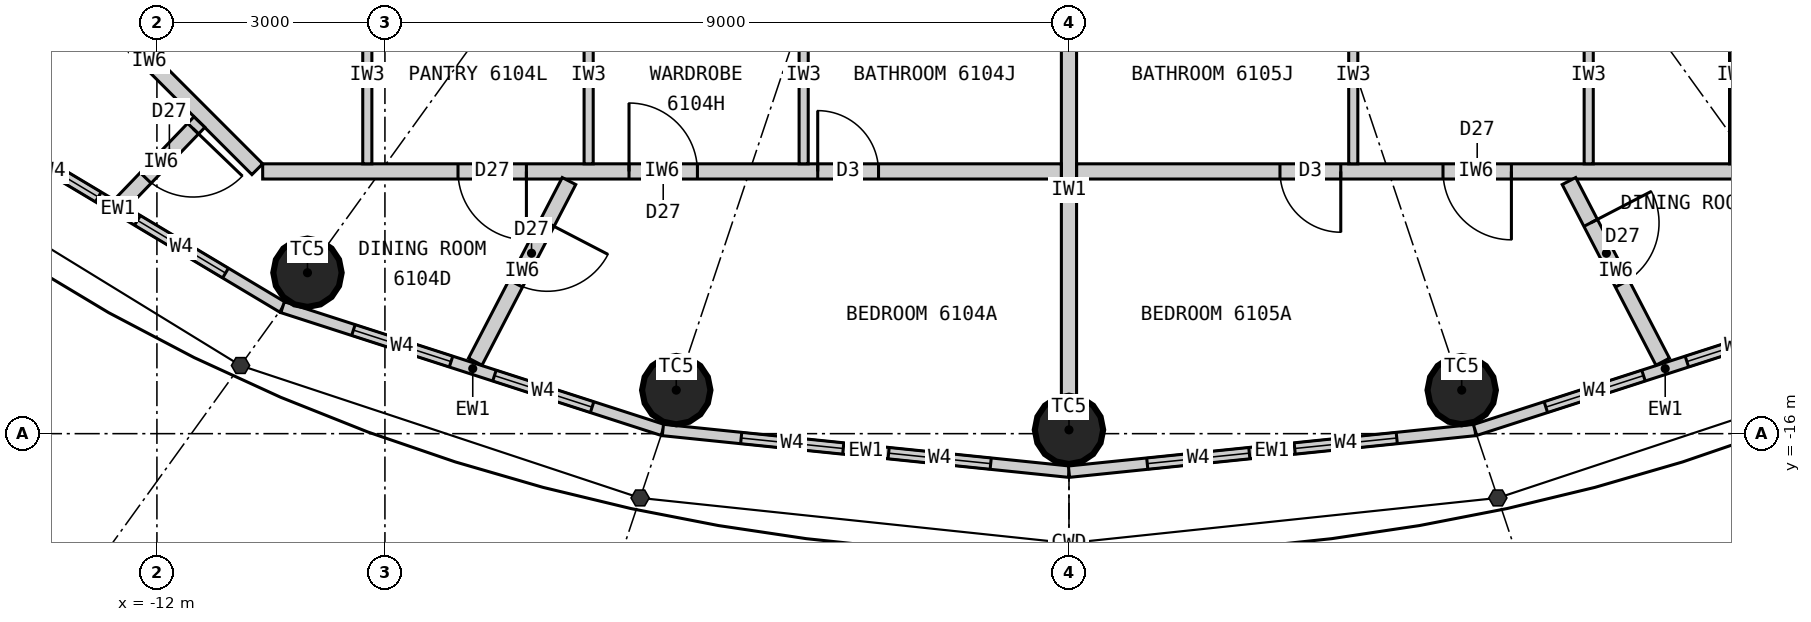
"""IFC4 building model, lengths in metres.
Left out: names, types, materials, properties, quantities, classifications, styles, units other than length and angle.
Written with IfcOpenShell. Run it as: python <this file> out.ifc"""

import sys

from ifc_helpers import new_model, si_unit, direction, frame, frame_2d, origin, origin_2d, place, context, subcontext, project, spatial, rectangle, circle, extrude, element, fill, save


model = new_model("IFC4")
c1 = context("Model", 3, precision=1e-05, world=origin(), true_north=direction((0.0, 1.0)))
c2 = subcontext(c1, "Body", "Model", "MODEL_VIEW")
j1 = project(units=[si_unit("LENGTHUNIT", "METRE"), si_unit("PLANEANGLEUNIT", "RADIAN")], contexts=[c1])
p1 = place(None, origin())
s1 = spatial("IfcSite", under=j1, at=p1, CompositionType="ELEMENT")
p2 = place(p1, origin())
s2 = spatial("IfcBuilding", under=s1, at=p2, CompositionType="ELEMENT")
p3 = place(p2, frame((0.0, 0.0, 225.9)))
s3 = spatial("IfcBuildingStorey", under=s2, at=p3, CompositionType="ELEMENT", Elevation=225.9)
for number, where, z_axis, x_axis in (
    (1, (-10.019, -13.883, 0.0), (0.0, 0.0, 1.0), (1.0, 0.0, 0.0)),
    (2, (-5.167, -15.427, 0.0), (0.0, 0.0, 1.0), (1.0, 0.0, 0.0)),
    (3, (0.0, -15.95, 0.0), (0.0, 0.0, 1.0), (1.0, 0.0, 0.0)),
    (4, (5.167, -15.427, 0.0), (0.0, 0.0, 1.0), (1.0, 0.0, 0.0)),
):
    element("IfcColumn", number, at=place(p3, frame(where, z_axis=z_axis, x_axis=x_axis)), inside=s3, PredefinedType="COLUMN", context=c2, shape_type="SweptSolid", body=[
        extrude(circle(Radius=0.45, at=origin_2d()), origin(), (0.0, 0.0, 1.0), 3.3),
    ])
p4 = place(p3, frame((-14.68, -11.744, 0.0), z_axis=(0.0, 0.0, 1.0), x_axis=(0.85822150553, -0.513279502265, 0.0)))
e5 = element("IfcWall", 5, at=p4, inside=s3, PredefinedType="ELEMENTEDWALL", context=c2, shape_type="SweptSolid", body=[
    extrude(rectangle(XDim=5.05, YDim=0.15, at=frame_2d((2.525, 0.0))), origin(), (0.0, 0.0, 1.0), 3.12),
])
p5 = place(p4, frame((0.875, 0.0, 0.9)))
e6 = element("IfcOpeningElement", 6, at=p5, cuts=e5, PredefinedType="OPENING", context=c2, shape_type="SweptSolid", body=[
    extrude(rectangle(XDim=1.35, YDim=1.9, at=frame_2d((0.675, 0.95))), frame((0.0, 0.085, 0.0), z_axis=(0.0, -1.0, 0.0), x_axis=(1.0, 0.0, 0.0)), (0.0, 0.0, 1.0), 0.17),
])
p6 = place(p4, frame((2.825, 0.0, 0.9)))
e7 = element("IfcOpeningElement", 7, at=p6, cuts=e5, PredefinedType="OPENING", context=c2, shape_type="SweptSolid", body=[
    extrude(rectangle(XDim=1.35, YDim=1.9, at=frame_2d((0.675, 0.95))), frame((0.0, 0.085, 0.0), z_axis=(0.0, -1.0, 0.0), x_axis=(1.0, 0.0, 0.0)), (0.0, 0.0, 1.0), 0.17),
])
p7 = place(p3, frame((-10.346, -14.336, 0.0), z_axis=(0.0, 0.0, 1.0), x_axis=(0.951644702515, -0.307200846638, 0.0)))
e8 = element("IfcWall", 8, at=p7, inside=s3, PredefinedType="ELEMENTEDWALL", context=c2, shape_type="SweptSolid", body=[
    extrude(rectangle(XDim=5.258, YDim=0.15, at=frame_2d((2.629, 0.0))), origin(), (0.0, 0.0, 1.0), 3.12),
])
p8 = place(p7, frame((0.979, 0.0, 0.9)))
e9 = element("IfcOpeningElement", 9, at=p8, cuts=e8, PredefinedType="OPENING", context=c2, shape_type="SweptSolid", body=[
    extrude(rectangle(XDim=1.35, YDim=1.9, at=frame_2d((0.675, 0.95))), frame((0.0, 0.085, 0.0), z_axis=(0.0, -1.0, 0.0), x_axis=(1.0, 0.0, 0.0)), (0.0, 0.0, 1.0), 0.17),
])
p9 = place(p7, frame((2.929, 0.0, 0.9)))
e10 = element("IfcOpeningElement", 10, at=p9, cuts=e8, PredefinedType="OPENING", context=c2, shape_type="SweptSolid", body=[
    extrude(rectangle(XDim=1.35, YDim=1.9, at=frame_2d((0.675, 0.95))), frame((0.0, 0.085, 0.0), z_axis=(0.0, -1.0, 0.0), x_axis=(1.0, 0.0, 0.0)), (0.0, 0.0, 1.0), 0.17),
])
p10 = place(p3, frame((-5.343, -15.952, 0.0), z_axis=(0.0, 0.0, 1.0), x_axis=(0.994774574972, -0.102095763818, 0.0)))
e11 = element("IfcWall", 11, at=p10, inside=s3, PredefinedType="ELEMENTEDWALL", context=c2, shape_type="SweptSolid", body=[
    extrude(rectangle(XDim=5.371, YDim=0.15, at=frame_2d((2.686, 0.0))), origin(), (0.0, 0.0, 1.0), 3.12),
])
p11 = place(p10, frame((1.035, 0.0, 0.9)))
e12 = element("IfcOpeningElement", 12, at=p11, cuts=e11, PredefinedType="OPENING", context=c2, shape_type="SweptSolid", body=[
    extrude(rectangle(XDim=1.35, YDim=1.9, at=frame_2d((0.675, 0.95))), frame((0.0, 0.085, 0.0), z_axis=(0.0, -1.0, 0.0), x_axis=(1.0, 0.0, 0.0)), (0.0, 0.0, 1.0), 0.17),
])
p12 = place(p10, frame((2.985, 0.0, 0.9)))
e13 = element("IfcOpeningElement", 13, at=p12, cuts=e11, PredefinedType="OPENING", context=c2, shape_type="SweptSolid", body=[
    extrude(rectangle(XDim=1.35, YDim=1.9, at=frame_2d((0.675, 0.95))), frame((0.0, 0.085, 0.0), z_axis=(0.0, -1.0, 0.0), x_axis=(1.0, 0.0, 0.0)), (0.0, 0.0, 1.0), 0.17),
])
p13 = place(p3, frame((0.0, -16.5, 0.0), z_axis=(0.0, 0.0, 1.0), x_axis=(0.994774574972, 0.102095763818, 0.0)))
e14 = element("IfcWall", 14, at=p13, inside=s3, PredefinedType="ELEMENTEDWALL", context=c2, shape_type="SweptSolid", body=[
    extrude(rectangle(XDim=5.371, YDim=0.15, at=frame_2d((2.686, 0.0))), origin(), (0.0, 0.0, 1.0), 3.12),
])
p14 = place(p13, frame((1.035, 0.0, 0.9)))
e15 = element("IfcOpeningElement", 15, at=p14, cuts=e14, PredefinedType="OPENING", context=c2, shape_type="SweptSolid", body=[
    extrude(rectangle(XDim=1.35, YDim=1.9, at=frame_2d((0.675, 0.95))), frame((0.0, 0.085, 0.0), z_axis=(0.0, -1.0, 0.0), x_axis=(1.0, 0.0, 0.0)), (0.0, 0.0, 1.0), 0.17),
])
p15 = place(p13, frame((2.985, 0.0, 0.9)))
e16 = element("IfcOpeningElement", 16, at=p15, cuts=e14, PredefinedType="OPENING", context=c2, shape_type="SweptSolid", body=[
    extrude(rectangle(XDim=1.35, YDim=1.9, at=frame_2d((0.675, 0.95))), frame((0.0, 0.085, 0.0), z_axis=(0.0, -1.0, 0.0), x_axis=(1.0, 0.0, 0.0)), (0.0, 0.0, 1.0), 0.17),
])
p16 = place(p3, frame((5.343, -15.952, 0.0), z_axis=(0.0, 0.0, 1.0), x_axis=(0.951644702515, 0.307200846638, 0.0)))
e17 = element("IfcWall", 17, at=p16, inside=s3, PredefinedType="ELEMENTEDWALL", context=c2, shape_type="SweptSolid", body=[
    extrude(rectangle(XDim=5.258, YDim=0.15, at=frame_2d((2.629, 0.0))), origin(), (0.0, 0.0, 1.0), 3.12),
])
p17 = place(p16, frame((0.979, 0.0, 0.9)))
e18 = element("IfcOpeningElement", 18, at=p17, cuts=e17, PredefinedType="OPENING", context=c2, shape_type="SweptSolid", body=[
    extrude(rectangle(XDim=1.35, YDim=1.9, at=frame_2d((0.675, 0.95))), frame((0.0, 0.085, 0.0), z_axis=(0.0, -1.0, 0.0), x_axis=(1.0, 0.0, 0.0)), (0.0, 0.0, 1.0), 0.17),
])
p18 = place(p16, frame((2.929, 0.0, 0.9)))
e19 = element("IfcOpeningElement", 19, at=p18, cuts=e17, PredefinedType="OPENING", context=c2, shape_type="SweptSolid", body=[
    extrude(rectangle(XDim=1.35, YDim=1.9, at=frame_2d((0.675, 0.95))), frame((0.0, 0.085, 0.0), z_axis=(0.0, -1.0, 0.0), x_axis=(1.0, 0.0, 0.0)), (0.0, 0.0, 1.0), 0.17),
])
p19 = place(p3, frame((0.0, -10.1, 0.0), z_axis=(0.0, 0.0, 1.0), x_axis=(0.0, -1.0, 0.0)))
e20 = element("IfcWall", 20, at=p19, inside=s3, PredefinedType="PARTITIONING", context=c2, shape_type="SweptSolid", body=[
    extrude(rectangle(XDim=5.4, YDim=0.2, at=frame_2d((2.7, 0.0))), origin(), (0.0, 0.0, 1.0), 2.42),
])
p20 = place(p3, frame((-13.521, -9.679, 0.0), z_axis=(0.0, 0.0, 1.0), x_axis=(0.707106781187, -0.707106781187, 0.0)))
e21 = element("IfcWall", 21, at=p20, inside=s3, PredefinedType="PARTITIONING", context=c2, shape_type="SweptSolid", body=[
    extrude(rectangle(XDim=4.019, YDim=0.2, at=frame_2d((2.009, 0.0))), origin(), (0.0, 0.0, 1.0), 3.12),
])
p21 = place(p3, frame((-10.609, -12.55, 0.0), z_axis=(0.0, 0.0, 1.0), x_axis=(1.0, 0.0, 0.0)))
e22 = element("IfcWall", 22, at=p21, inside=s3, PredefinedType="PARTITIONING", context=c2, shape_type="SweptSolid", body=[
    extrude(rectangle(XDim=10.508, YDim=0.2, at=frame_2d((5.254, 0.0))), origin(), (0.0, 0.0, 1.0), 3.12),
])
p22 = place(p21, frame((2.57, 0.0, 0.0)))
e23 = element("IfcOpeningElement", 23, at=p22, cuts=e22, PredefinedType="OPENING", context=c2, shape_type="SweptSolid", body=[
    extrude(rectangle(XDim=0.9, YDim=2.1, at=frame_2d((0.45, 1.05))), frame((0.0, 0.11, 0.0), z_axis=(0.0, -1.0, 0.0), x_axis=(1.0, 0.0, 0.0)), (0.0, 0.0, 1.0), 0.22),
])
p23 = place(p21, frame((4.82, 0.0, 0.0)))
e24 = element("IfcOpeningElement", 24, at=p23, cuts=e22, PredefinedType="OPENING", context=c2, shape_type="SweptSolid", body=[
    extrude(rectangle(XDim=0.9, YDim=2.1, at=frame_2d((0.45, 1.05))), frame((0.0, 0.11, 0.0), z_axis=(0.0, -1.0, 0.0), x_axis=(1.0, 0.0, 0.0)), (0.0, 0.0, 1.0), 0.22),
])
p24 = place(p21, frame((7.303, 0.0, 0.0)))
e25 = element("IfcOpeningElement", 25, at=p24, cuts=e22, PredefinedType="OPENING", context=c2, shape_type="SweptSolid", body=[
    extrude(rectangle(XDim=0.8, YDim=2.1, at=frame_2d((0.4, 1.05))), frame((0.0, 0.11, 0.0), z_axis=(0.0, -1.0, 0.0), x_axis=(1.0, 0.0, 0.0)), (0.0, 0.0, 1.0), 0.22),
])
p25 = place(p3, frame((-11.441, -11.9, 0.0), z_axis=(0.0, 0.0, 1.0), x_axis=(-0.692958717259, -0.720977264672, 0.0)))
e26 = element("IfcWall", 26, at=p25, inside=s3, PredefinedType="PARTITIONING", context=c2, shape_type="SweptSolid", body=[
    extrude(rectangle(XDim=1.464, YDim=0.2, at=frame_2d((0.732, 0.0))), origin(), (0.0, 0.0, 1.0), 3.12),
])
p26 = place(p25, frame((0.12, 0.0, 0.0)))
e27 = element("IfcOpeningElement", 27, at=p26, cuts=e26, PredefinedType="OPENING", context=c2, shape_type="SweptSolid", body=[
    extrude(rectangle(XDim=0.9, YDim=2.1, at=frame_2d((0.45, 1.05))), frame((0.0, 0.11, 0.0), z_axis=(0.0, -1.0, 0.0), x_axis=(1.0, 0.0, 0.0)), (0.0, 0.0, 1.0), 0.22),
])
p27 = place(p3, frame((-6.578, -12.677, 0.0), z_axis=(0.0, 0.0, 1.0), x_axis=(-0.460620531465, -0.887597164255, 0.0)))
e28 = element("IfcWall", 28, at=p27, inside=s3, PredefinedType="PARTITIONING", context=c2, shape_type="SweptSolid", body=[
    extrude(rectangle(XDim=2.678, YDim=0.2, at=frame_2d((1.339, 0.0))), origin(), (0.0, 0.0, 1.0), 3.12),
])
p28 = place(p27, frame((0.62, 0.0, 0.0)))
e29 = element("IfcOpeningElement", 29, at=p28, cuts=e28, PredefinedType="OPENING", context=c2, shape_type="SweptSolid", body=[
    extrude(rectangle(XDim=0.9, YDim=2.1, at=frame_2d((0.45, 1.05))), frame((0.0, 0.11, 0.0), z_axis=(0.0, -1.0, 0.0), x_axis=(1.0, 0.0, 0.0)), (0.0, 0.0, 1.0), 0.22),
])
for number, where, z_axis, x_axis in (
    (30, (-9.232, -10.1, 0.0), (0.0, 0.0, 1.0), (0.0, -1.0, 0.0)),
    (31, (-6.32, -10.1, 0.0), (0.0, 0.0, 1.0), (0.0, -1.0, 0.0)),
    (32, (-3.491, -10.1, 0.0), (0.0, 0.0, 1.0), (0.0, -1.0, 0.0)),
):
    element("IfcWall", number, at=place(p3, frame(where, z_axis=z_axis, x_axis=x_axis)), inside=s3, PredefinedType="PARTITIONING", context=c2, shape_type="SweptSolid", body=[
        extrude(rectangle(XDim=2.35, YDim=0.12, at=frame_2d((1.175, 0.0))), origin(), (0.0, 0.0, 1.0), 3.12),
    ])
p29 = place(p3, frame((0.101, -12.55, 0.0), z_axis=(0.0, 0.0, 1.0), x_axis=(1.0, 0.0, 0.0)))
e33 = element("IfcWall", 33, at=p29, inside=s3, PredefinedType="PARTITIONING", context=c2, shape_type="SweptSolid", body=[
    extrude(rectangle(XDim=10.508, YDim=0.2, at=frame_2d((5.254, 0.0))), origin(), (0.0, 0.0, 1.0), 3.12),
])
p30 = place(p29, frame((2.675, 0.0, 0.0)))
e34 = element("IfcOpeningElement", 34, at=p30, cuts=e33, PredefinedType="OPENING", context=c2, shape_type="SweptSolid", body=[
    extrude(rectangle(XDim=0.8, YDim=2.1, at=frame_2d((0.4, 1.05))), frame((0.0, 0.11, 0.0), z_axis=(0.0, -1.0, 0.0), x_axis=(1.0, 0.0, 0.0)), (0.0, 0.0, 1.0), 0.22),
])
p31 = place(p29, frame((4.82, 0.0, 0.0)))
e35 = element("IfcOpeningElement", 35, at=p31, cuts=e33, PredefinedType="OPENING", context=c2, shape_type="SweptSolid", body=[
    extrude(rectangle(XDim=0.9, YDim=2.1, at=frame_2d((0.45, 1.05))), frame((0.0, 0.11, 0.0), z_axis=(0.0, -1.0, 0.0), x_axis=(1.0, 0.0, 0.0)), (0.0, 0.0, 1.0), 0.22),
])
p32 = place(p3, frame((6.578, -12.677, 0.0), z_axis=(0.0, 0.0, 1.0), x_axis=(0.460620531465, -0.887597164255, 0.0)))
e36 = element("IfcWall", 36, at=p32, inside=s3, PredefinedType="PARTITIONING", context=c2, shape_type="SweptSolid", body=[
    extrude(rectangle(XDim=2.678, YDim=0.2, at=frame_2d((1.339, 0.0))), origin(), (0.0, 0.0, 1.0), 3.12),
])
p33 = place(p32, frame((0.62, 0.0, 0.0)))
e37 = element("IfcOpeningElement", 37, at=p33, cuts=e36, PredefinedType="OPENING", context=c2, shape_type="SweptSolid", body=[
    extrude(rectangle(XDim=0.9, YDim=2.1, at=frame_2d((0.45, 1.05))), frame((0.0, 0.11, 0.0), z_axis=(0.0, -1.0, 0.0), x_axis=(1.0, 0.0, 0.0)), (0.0, 0.0, 1.0), 0.22),
])
for number, where, z_axis, x_axis in (
    (38, (3.74, -10.1, 0.0), (0.0, 0.0, 1.0), (0.0, -1.0, 0.0)),
    (39, (6.838, -10.1, 0.0), (0.0, 0.0, 1.0), (0.0, -1.0, 0.0)),
):
    element("IfcWall", number, at=place(p3, frame(where, z_axis=z_axis, x_axis=x_axis)), inside=s3, PredefinedType="PARTITIONING", context=c2, shape_type="SweptSolid", body=[
        extrude(rectangle(XDim=2.35, YDim=0.12, at=frame_2d((1.175, 0.0))), origin(), (0.0, 0.0, 1.0), 3.12),
    ])
p34 = place(p3, frame((8.751, -10.1, 0.0), z_axis=(0.0, 0.0, 1.0), x_axis=(0.0, -1.0, 0.0)))
e40 = element("IfcWall", 40, at=p34, inside=s3, PredefinedType="PARTITIONING", context=c2, shape_type="SweptSolid", body=[
    extrude(rectangle(XDim=2.35, YDim=0.12, at=frame_2d((1.175, 0.0))), origin(), (0.0, 0.0, 1.0), 3.12),
])
p35 = place(p34, frame((0.77, 0.0, 0.0)))
e41 = element("IfcOpeningElement", 41, at=p35, cuts=e40, PredefinedType="OPENING", context=c2, shape_type="SweptSolid", body=[
    extrude(rectangle(XDim=0.8, YDim=2.1, at=frame_2d((0.4, 1.05))), frame((0.0, 0.07, 0.0), z_axis=(0.0, -1.0, 0.0), x_axis=(1.0, 0.0, 0.0)), (0.0, 0.0, 1.0), 0.14),
])
p36 = place(p5, origin())
e42 = element("IfcWindow", 42, at=p36, inside=s3, PartitioningType="SINGLE_PANEL", PredefinedType="WINDOW", context=c2, shape_type="SweptSolid", body=[
    extrude(rectangle(XDim=1.35, YDim=1.9, at=frame_2d((0.675, 0.95))), frame((0.0, 0.03, 0.0), z_axis=(0.0, -1.0, 0.0), x_axis=(1.0, 0.0, 0.0)), (0.0, 0.0, 1.0), 0.06),
])
fill(e6, e42)
p37 = place(p6, origin())
e43 = element("IfcWindow", 43, at=p37, inside=s3, PartitioningType="SINGLE_PANEL", PredefinedType="WINDOW", context=c2, shape_type="SweptSolid", body=[
    extrude(rectangle(XDim=1.35, YDim=1.9, at=frame_2d((0.675, 0.95))), frame((0.0, 0.03, 0.0), z_axis=(0.0, -1.0, 0.0), x_axis=(1.0, 0.0, 0.0)), (0.0, 0.0, 1.0), 0.06),
])
fill(e7, e43)
p38 = place(p8, origin())
e44 = element("IfcWindow", 44, at=p38, inside=s3, PartitioningType="SINGLE_PANEL", PredefinedType="WINDOW", context=c2, shape_type="SweptSolid", body=[
    extrude(rectangle(XDim=1.35, YDim=1.9, at=frame_2d((0.675, 0.95))), frame((0.0, 0.03, 0.0), z_axis=(0.0, -1.0, 0.0), x_axis=(1.0, 0.0, 0.0)), (0.0, 0.0, 1.0), 0.06),
])
fill(e9, e44)
p39 = place(p9, origin())
e45 = element("IfcWindow", 45, at=p39, inside=s3, PartitioningType="SINGLE_PANEL", PredefinedType="WINDOW", context=c2, shape_type="SweptSolid", body=[
    extrude(rectangle(XDim=1.35, YDim=1.9, at=frame_2d((0.675, 0.95))), frame((0.0, 0.03, 0.0), z_axis=(0.0, -1.0, 0.0), x_axis=(1.0, 0.0, 0.0)), (0.0, 0.0, 1.0), 0.06),
])
fill(e10, e45)
p40 = place(p11, origin())
e46 = element("IfcWindow", 46, at=p40, inside=s3, PartitioningType="SINGLE_PANEL", PredefinedType="WINDOW", context=c2, shape_type="SweptSolid", body=[
    extrude(rectangle(XDim=1.35, YDim=1.9, at=frame_2d((0.675, 0.95))), frame((0.0, 0.03, 0.0), z_axis=(0.0, -1.0, 0.0), x_axis=(1.0, 0.0, 0.0)), (0.0, 0.0, 1.0), 0.06),
])
fill(e12, e46)
p41 = place(p12, origin())
e47 = element("IfcWindow", 47, at=p41, inside=s3, PartitioningType="SINGLE_PANEL", PredefinedType="WINDOW", context=c2, shape_type="SweptSolid", body=[
    extrude(rectangle(XDim=1.35, YDim=1.9, at=frame_2d((0.675, 0.95))), frame((0.0, 0.03, 0.0), z_axis=(0.0, -1.0, 0.0), x_axis=(1.0, 0.0, 0.0)), (0.0, 0.0, 1.0), 0.06),
])
fill(e13, e47)
p42 = place(p14, origin())
e48 = element("IfcWindow", 48, at=p42, inside=s3, PartitioningType="SINGLE_PANEL", PredefinedType="WINDOW", context=c2, shape_type="SweptSolid", body=[
    extrude(rectangle(XDim=1.35, YDim=1.9, at=frame_2d((0.675, 0.95))), frame((0.0, 0.03, 0.0), z_axis=(0.0, -1.0, 0.0), x_axis=(1.0, 0.0, 0.0)), (0.0, 0.0, 1.0), 0.06),
])
fill(e15, e48)
p43 = place(p15, origin())
e49 = element("IfcWindow", 49, at=p43, inside=s3, PartitioningType="SINGLE_PANEL", PredefinedType="WINDOW", context=c2, shape_type="SweptSolid", body=[
    extrude(rectangle(XDim=1.35, YDim=1.9, at=frame_2d((0.675, 0.95))), frame((0.0, 0.03, 0.0), z_axis=(0.0, -1.0, 0.0), x_axis=(1.0, 0.0, 0.0)), (0.0, 0.0, 1.0), 0.06),
])
fill(e16, e49)
p44 = place(p17, origin())
e50 = element("IfcWindow", 50, at=p44, inside=s3, PartitioningType="SINGLE_PANEL", PredefinedType="WINDOW", context=c2, shape_type="SweptSolid", body=[
    extrude(rectangle(XDim=1.35, YDim=1.9, at=frame_2d((0.675, 0.95))), frame((0.0, 0.03, 0.0), z_axis=(0.0, -1.0, 0.0), x_axis=(1.0, 0.0, 0.0)), (0.0, 0.0, 1.0), 0.06),
])
fill(e18, e50)
p45 = place(p18, origin())
e51 = element("IfcWindow", 51, at=p45, inside=s3, PartitioningType="SINGLE_PANEL", PredefinedType="WINDOW", context=c2, shape_type="SweptSolid", body=[
    extrude(rectangle(XDim=1.35, YDim=1.9, at=frame_2d((0.675, 0.95))), frame((0.0, 0.03, 0.0), z_axis=(0.0, -1.0, 0.0), x_axis=(1.0, 0.0, 0.0)), (0.0, 0.0, 1.0), 0.06),
])
fill(e19, e51)
p46 = place(p22, origin())
e52 = element("IfcDoor", 52, at=p46, inside=s3, OperationType="SINGLE_SWING_RIGHT", PredefinedType="DOOR", context=c2, shape_type="SweptSolid", body=[
    extrude(rectangle(XDim=0.9, YDim=2.1, at=frame_2d((0.45, 1.05))), frame((0.0, 0.025, 0.0), z_axis=(0.0, -1.0, 0.0), x_axis=(1.0, 0.0, 0.0)), (0.0, 0.0, 1.0), 0.05),
])
fill(e23, e52)
p47 = place(p23, origin())
e53 = element("IfcDoor", 53, at=p47, inside=s3, OperationType="SINGLE_SWING_LEFT", PredefinedType="DOOR", context=c2, shape_type="SweptSolid", body=[
    extrude(rectangle(XDim=0.9, YDim=2.1, at=frame_2d((0.45, 1.05))), frame((0.0, 0.025, 0.0), z_axis=(0.0, -1.0, 0.0), x_axis=(1.0, 0.0, 0.0)), (0.0, 0.0, 1.0), 0.05),
])
fill(e24, e53)
p48 = place(p24, origin())
e54 = element("IfcDoor", 54, at=p48, inside=s3, OperationType="SINGLE_SWING_LEFT", PredefinedType="DOOR", context=c2, shape_type="SweptSolid", body=[
    extrude(rectangle(XDim=0.8, YDim=2.1, at=frame_2d((0.4, 1.05))), frame((0.0, 0.025, 0.0), z_axis=(0.0, -1.0, 0.0), x_axis=(1.0, 0.0, 0.0)), (0.0, 0.0, 1.0), 0.05),
])
fill(e25, e54)
p49 = place(p26, origin())
e55 = element("IfcDoor", 55, at=p49, inside=s3, OperationType="SINGLE_SWING_LEFT", PredefinedType="DOOR", context=c2, shape_type="SweptSolid", body=[
    extrude(rectangle(XDim=0.9, YDim=2.1, at=frame_2d((0.45, 1.05))), frame((0.0, 0.025, 0.0), z_axis=(0.0, -1.0, 0.0), x_axis=(1.0, 0.0, 0.0)), (0.0, 0.0, 1.0), 0.05),
])
fill(e27, e55)
p50 = place(p28, origin())
e56 = element("IfcDoor", 56, at=p50, inside=s3, OperationType="SINGLE_SWING_LEFT", PredefinedType="DOOR", context=c2, shape_type="SweptSolid", body=[
    extrude(rectangle(XDim=0.9, YDim=2.1, at=frame_2d((0.45, 1.05))), frame((0.0, 0.025, 0.0), z_axis=(0.0, -1.0, 0.0), x_axis=(1.0, 0.0, 0.0)), (0.0, 0.0, 1.0), 0.05),
])
fill(e29, e56)
p51 = place(p30, origin())
e57 = element("IfcDoor", 57, at=p51, inside=s3, OperationType="SINGLE_SWING_RIGHT", PredefinedType="DOOR", context=c2, shape_type="SweptSolid", body=[
    extrude(rectangle(XDim=0.8, YDim=2.1, at=frame_2d((0.4, 1.05))), frame((0.0, 0.025, 0.0), z_axis=(0.0, -1.0, 0.0), x_axis=(1.0, 0.0, 0.0)), (0.0, 0.0, 1.0), 0.05),
])
fill(e34, e57)
p52 = place(p31, origin())
e58 = element("IfcDoor", 58, at=p52, inside=s3, OperationType="SINGLE_SWING_RIGHT", PredefinedType="DOOR", context=c2, shape_type="SweptSolid", body=[
    extrude(rectangle(XDim=0.9, YDim=2.1, at=frame_2d((0.45, 1.05))), frame((0.0, 0.025, 0.0), z_axis=(0.0, -1.0, 0.0), x_axis=(1.0, 0.0, 0.0)), (0.0, 0.0, 1.0), 0.05),
])
fill(e35, e58)
p53 = place(p33, origin())
e59 = element("IfcDoor", 59, at=p53, inside=s3, OperationType="SINGLE_SWING_LEFT", PredefinedType="DOOR", context=c2, shape_type="SweptSolid", body=[
    extrude(rectangle(XDim=0.9, YDim=2.1, at=frame_2d((0.45, 1.05))), frame((0.0, 0.025, 0.0), z_axis=(0.0, -1.0, 0.0), x_axis=(1.0, 0.0, 0.0)), (0.0, 0.0, 1.0), 0.05),
])
fill(e37, e59)
save(model, sys.argv[1])
